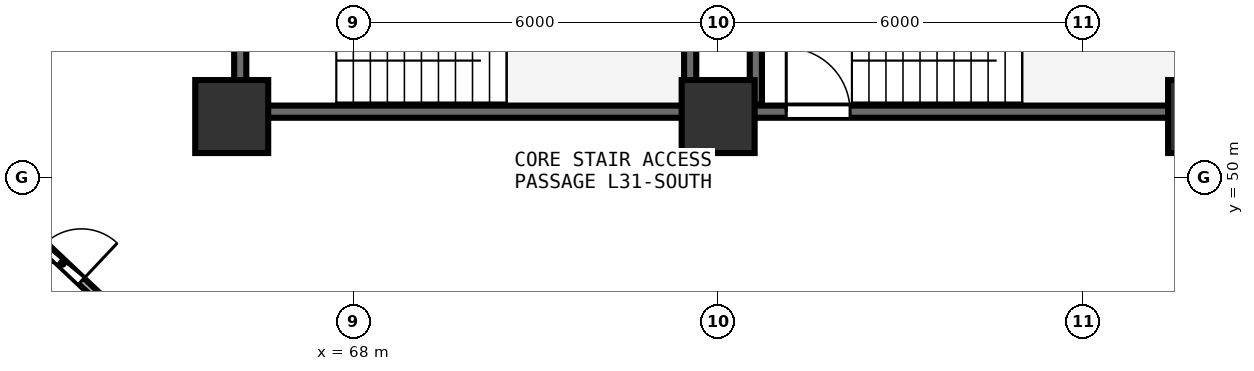
"""IFC4 building model, lengths in metres.
Left out: names, types, materials, properties, quantities, classifications, styles, units other than length and angle.
Written with IfcOpenShell. Run it as: python <this file> out.ifc"""

import sys

from ifc_helpers import new_model, si_unit, direction, frame, frame_2d, origin, origin_2d, place, context, subcontext, project, spatial, rectangle, extrude, element, fill, save


model = new_model("IFC4")
c1 = context("Model", 3, precision=1e-05, world=origin(), true_north=direction((0.0, 1.0)))
c2 = subcontext(c1, "Body", "Model", "MODEL_VIEW")
j1 = project(units=[si_unit("LENGTHUNIT", "METRE"), si_unit("PLANEANGLEUNIT", "RADIAN")], contexts=[c1])
p1 = place(None, origin())
s1 = spatial("IfcSite", under=j1, at=p1, CompositionType="ELEMENT")
p2 = place(p1, origin())
s2 = spatial("IfcBuilding", under=s1, at=p2, CompositionType="ELEMENT")
p3 = place(p2, frame((0.0, 0.0, 121.35)))
s3 = spatial("IfcBuildingStorey", under=s2, at=p3, CompositionType="ELEMENT", Elevation=121.35)
for number, where, z_axis, x_axis in (
    (1, (66.0, 51.0, 0.0), (0.0, 0.0, 1.0), (1.0, 0.0, 0.0)),
    (2, (74.0, 51.0, 0.0), (0.0, 0.0, 1.0), (1.0, 0.0, 0.0)),
    (3, (82.0, 51.0, 0.0), (0.0, 0.0, 1.0), (1.0, 0.0, 0.0)),
):
    element("IfcColumn", number, at=place(p3, frame(where, z_axis=z_axis, x_axis=x_axis)), inside=s3, PredefinedType="PILASTER", context=c2, shape_type="SweptSolid", body=[
        extrude(rectangle(XDim=1.2, YDim=1.2, at=origin_2d()), origin(), (0.0, 0.0, 1.0), 3.75),
    ])
p4 = place(p3, frame((74.0, 51.08, 0.0), z_axis=(0.0, 0.0, 1.0), x_axis=(1.0, 0.0, 0.0)))
e4 = element("IfcWall", 4, at=p4, inside=s3, PredefinedType="SHEAR", context=c2, shape_type="SweptSolid", body=[
    extrude(rectangle(XDim=7.9, YDim=0.2, at=frame_2d((3.95, 0.0))), origin(), (0.0, 0.0, 1.0), 3.49),
])
p5 = place(p4, frame((1.12, 0.0, 0.0)))
e5 = element("IfcOpeningElement", 5, at=p5, cuts=e4, PredefinedType="OPENING", context=c2, shape_type="SweptSolid", body=[
    extrude(rectangle(XDim=1.05, YDim=2.1, at=frame_2d((0.525, 1.05))), frame((0.0, 0.11, 0.0), z_axis=(0.0, -1.0, 0.0), x_axis=(1.0, 0.0, 0.0)), (0.0, 0.0, 1.0), 0.22),
])
p6 = place(p3, frame((74.62, 54.27, 0.0), z_axis=(0.0, 0.0, 1.0), x_axis=(0.0, -1.0, 0.0)))
e6 = element("IfcWall", 6, at=p6, inside=s3, PredefinedType="SHEAR", context=c2, shape_type="SweptSolid", body=[
    extrude(rectangle(XDim=3.07, YDim=0.2, at=frame_2d((1.535, 0.0))), origin(), (0.0, 0.0, 1.0), 3.49),
])
p7 = place(p3, frame((66.26, 51.08, 0.0), z_axis=(0.0, 0.0, 1.0), x_axis=(1.0, 0.0, 0.0)))
e7 = element("IfcWall", 7, at=p7, inside=s3, PredefinedType="SHEAR", context=c2, shape_type="SweptSolid", body=[
    extrude(rectangle(XDim=7.16, YDim=0.2, at=frame_2d((3.58, 0.0))), origin(), (0.0, 0.0, 1.0), 3.49),
])
p8 = place(p3, frame((73.54, 51.2, 0.0), z_axis=(0.0, 0.0, 1.0), x_axis=(0.0, 1.0, 0.0)))
e8 = element("IfcWall", 8, at=p8, inside=s3, PredefinedType="SHEAR", context=c2, shape_type="SweptSolid", body=[
    extrude(rectangle(XDim=3.07, YDim=0.2, at=frame_2d((1.535, 0.0))), origin(), (0.0, 0.0, 1.0), 3.49),
])
p9 = place(p3, frame((66.14, 54.27, 0.0), z_axis=(0.0, 0.0, 1.0), x_axis=(0.0, -1.0, 0.0)))
e9 = element("IfcWall", 9, at=p9, inside=s3, PredefinedType="SHEAR", context=c2, shape_type="SweptSolid", body=[
    extrude(rectangle(XDim=3.07, YDim=0.2, at=frame_2d((1.535, 0.0))), origin(), (0.0, 0.0, 1.0), 3.49),
])
p10 = place(p9, frame((1.01, 0.0, 0.0)))
e10 = element("IfcOpeningElement", 10, at=p10, cuts=e9, PredefinedType="OPENING", context=c2, shape_type="SweptSolid", body=[
    extrude(rectangle(XDim=1.05, YDim=2.1, at=frame_2d((0.525, 1.05))), frame((0.0, 0.11, 0.0), z_axis=(0.0, -1.0, 0.0), x_axis=(1.0, 0.0, 0.0)), (0.0, 0.0, 1.0), 0.22),
])
p11 = place(p3, frame((62.314, 49.437, 0.0), z_axis=(0.0, 0.0, 1.0), x_axis=(0.727704720547, -0.68589054498, 0.0)))
e11 = element("IfcWall", 11, at=p11, inside=s3, PredefinedType="PLUMBINGWALL", context=c2, shape_type="SweptSolid", body=[
    extrude(rectangle(XDim=2.476, YDim=0.13, at=frame_2d((1.238, 0.0))), origin(), (0.0, 0.0, 1.0), 2.925),
])
p12 = place(p11, frame((0.808, 0.0, 0.0)))
e12 = element("IfcOpeningElement", 12, at=p12, cuts=e11, PredefinedType="OPENING", context=c2, shape_type="SweptSolid", body=[
    extrude(rectangle(XDim=0.86, YDim=2.05, at=frame_2d((0.43, 1.025))), frame((0.0, 0.075, 0.0), z_axis=(0.0, -1.0, 0.0), x_axis=(1.0, 0.0, 0.0)), (0.0, 0.0, 1.0), 0.15),
])
p13 = place(p3, frame((80.601, 45.768, 0.0), z_axis=(0.0, 0.0, 1.0), x_axis=(0.815932399176, 0.578147316846, 0.0)))
e13 = element("IfcWall", 13, at=p13, inside=s3, PredefinedType="PARTITIONING", context=c2, shape_type="SweptSolid", body=[
    extrude(rectangle(XDim=5.993, YDim=0.12, at=frame_2d((2.997, 0.0))), origin(), (0.0, 0.0, 1.0), 2.925),
])
p14 = place(p13, frame((2.546, 0.0, 0.0)))
e14 = element("IfcOpeningElement", 14, at=p14, cuts=e13, PredefinedType="OPENING", context=c2, shape_type="SweptSolid", body=[
    extrude(rectangle(XDim=0.9, YDim=2.08, at=frame_2d((0.45, 1.04))), frame((0.0, 0.07, 0.0), z_axis=(0.0, -1.0, 0.0), x_axis=(1.0, 0.0, 0.0)), (0.0, 0.0, 1.0), 0.14),
])
p15 = place(p5, origin())
e15 = element("IfcDoor", 15, at=p15, inside=s3, OperationType="SINGLE_SWING_LEFT", PredefinedType="DOOR", context=c2, shape_type="SweptSolid", body=[
    extrude(rectangle(XDim=1.05, YDim=2.1, at=frame_2d((0.525, 1.05))), frame((0.0, 0.025, 0.0), z_axis=(0.0, -1.0, 0.0), x_axis=(1.0, 0.0, 0.0)), (0.0, 0.0, 1.0), 0.05),
])
fill(e5, e15)
p16 = place(p12, origin())
e16 = element("IfcDoor", 16, at=p16, inside=s3, OperationType="SINGLE_SWING_RIGHT", PredefinedType="DOOR", context=c2, shape_type="SweptSolid", body=[
    extrude(rectangle(XDim=0.86, YDim=2.05, at=frame_2d((0.43, 1.025))), frame((0.0, 0.025, 0.0), z_axis=(0.0, -1.0, 0.0), x_axis=(1.0, 0.0, 0.0)), (0.0, 0.0, 1.0), 0.05),
])
fill(e12, e16)
save(model, sys.argv[1])
